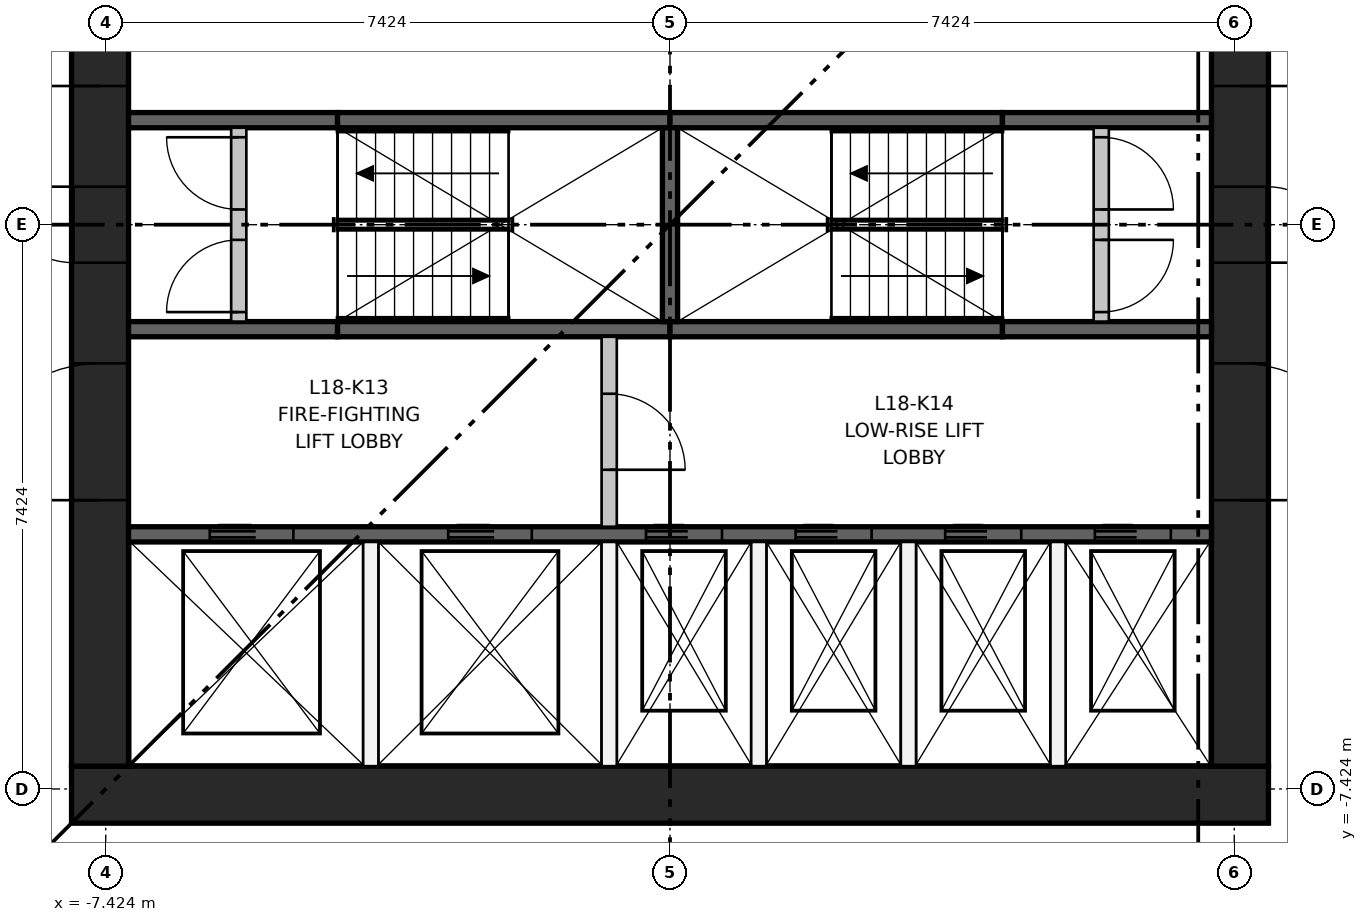
"""IFC4 building model, lengths in metres.
Left out: names, types, materials, properties, quantities, classifications, styles, units other than length and angle.
Written with IfcOpenShell. Run it as: python <this file> out.ifc"""

import sys

from ifc_helpers import new_model, si_unit, direction, frame, frame_2d, origin, place, context, subcontext, project, spatial, rectangle, extrude, element, fill, save


model = new_model("IFC4")
c1 = context("Model", 3, precision=1e-05, world=origin(), true_north=direction((0.0, 1.0)))
c2 = subcontext(c1, "Body", "Model", "MODEL_VIEW")
j1 = project(units=[si_unit("LENGTHUNIT", "METRE"), si_unit("PLANEANGLEUNIT", "RADIAN")], contexts=[c1])
p1 = place(None, origin())
s1 = spatial("IfcSite", under=j1, at=p1, CompositionType="ELEMENT")
p2 = place(p1, origin())
s2 = spatial("IfcBuilding", under=s1, at=p2, CompositionType="ELEMENT")
p3 = place(p2, frame((0.0, 0.0, 72.75)))
s3 = spatial("IfcBuildingStorey", under=s2, at=p3, CompositionType="ELEMENT", Elevation=72.75)
p4 = place(p3, frame((-7.874, -7.499, 0.0), z_axis=(0.0, 0.0, 1.0), x_axis=(1.0, 0.0, 0.0)))
e1 = element("IfcWall", 1, at=p4, inside=s3, PredefinedType="SHEAR", context=c2, shape_type="SweptSolid", body=[
    extrude(rectangle(XDim=15.748, YDim=0.75, at=frame_2d((7.874, 0.0))), origin(), (0.0, 0.0, 1.0), 3.65),
])
p5 = place(p3, frame((-7.499, -7.124, 0.0), z_axis=(0.0, 0.0, 1.0), x_axis=(0.0, 1.0, 0.0)))
e2 = element("IfcWall", 2, at=p5, inside=s3, PredefinedType="SHEAR", context=c2, shape_type="SweptSolid", body=[
    extrude(rectangle(XDim=14.248, YDim=0.75, at=frame_2d((7.124, 0.0))), origin(), (0.0, 0.0, 1.0), 3.65),
])
p6 = place(p5, frame((6.624, 0.0, 0.0)))
e3 = element("IfcOpeningElement", 3, at=p6, cuts=e2, PredefinedType="OPENING", context=c2, shape_type="SweptSolid", body=[
    extrude(rectangle(XDim=1.0, YDim=2.1, at=frame_2d((0.5, 1.05))), frame((0.0, 0.385, 0.0), z_axis=(0.0, -1.0, 0.0), x_axis=(1.0, 0.0, 0.0)), (0.0, 0.0, 1.0), 0.77),
])
p7 = place(p5, frame((3.5, 0.0, 0.0)))
e4 = element("IfcOpeningElement", 4, at=p7, cuts=e2, PredefinedType="OPENING", context=c2, shape_type="SweptSolid", body=[
    extrude(rectangle(XDim=1.8, YDim=2.1, at=frame_2d((0.9, 1.05))), frame((0.0, 0.385, 0.0), z_axis=(0.0, -1.0, 0.0), x_axis=(1.0, 0.0, 0.0)), (0.0, 0.0, 1.0), 0.77),
])
p8 = place(p5, frame((8.948, 0.0, 0.0)))
e5 = element("IfcOpeningElement", 5, at=p8, cuts=e2, PredefinedType="OPENING", context=c2, shape_type="SweptSolid", body=[
    extrude(rectangle(XDim=1.8, YDim=2.1, at=frame_2d((0.9, 1.05))), frame((0.0, 0.385, 0.0), z_axis=(0.0, -1.0, 0.0), x_axis=(1.0, 0.0, 0.0)), (0.0, 0.0, 1.0), 0.77),
])
p9 = place(p5, frame((12.124, 0.0, 0.0)))
e6 = element("IfcOpeningElement", 6, at=p9, cuts=e2, PredefinedType="OPENING", context=c2, shape_type="SweptSolid", body=[
    extrude(rectangle(XDim=1.0, YDim=2.1, at=frame_2d((0.5, 1.05))), frame((0.0, 0.385, 0.0), z_axis=(0.0, -1.0, 0.0), x_axis=(1.0, 0.0, 0.0)), (0.0, 0.0, 1.0), 0.77),
])
p10 = place(p3, frame((7.499, -7.124, 0.0), z_axis=(0.0, 0.0, 1.0), x_axis=(0.0, 1.0, 0.0)))
e7 = element("IfcWall", 7, at=p10, inside=s3, PredefinedType="SHEAR", context=c2, shape_type="SweptSolid", body=[
    extrude(rectangle(XDim=14.248, YDim=0.75, at=frame_2d((7.124, 0.0))), origin(), (0.0, 0.0, 1.0), 3.65),
])
p11 = place(p10, frame((6.624, 0.0, 0.0)))
e8 = element("IfcOpeningElement", 8, at=p11, cuts=e7, PredefinedType="OPENING", context=c2, shape_type="SweptSolid", body=[
    extrude(rectangle(XDim=1.0, YDim=2.1, at=frame_2d((0.5, 1.05))), frame((0.0, 0.385, 0.0), z_axis=(0.0, -1.0, 0.0), x_axis=(1.0, 0.0, 0.0)), (0.0, 0.0, 1.0), 0.77),
])
p12 = place(p10, frame((3.5, 0.0, 0.0)))
e9 = element("IfcOpeningElement", 9, at=p12, cuts=e7, PredefinedType="OPENING", context=c2, shape_type="SweptSolid", body=[
    extrude(rectangle(XDim=1.8, YDim=2.1, at=frame_2d((0.9, 1.05))), frame((0.0, 0.385, 0.0), z_axis=(0.0, -1.0, 0.0), x_axis=(1.0, 0.0, 0.0)), (0.0, 0.0, 1.0), 0.77),
])
p13 = place(p10, frame((8.948, 0.0, 0.0)))
e10 = element("IfcOpeningElement", 10, at=p13, cuts=e7, PredefinedType="OPENING", context=c2, shape_type="SweptSolid", body=[
    extrude(rectangle(XDim=1.8, YDim=2.1, at=frame_2d((0.9, 1.05))), frame((0.0, 0.385, 0.0), z_axis=(0.0, -1.0, 0.0), x_axis=(1.0, 0.0, 0.0)), (0.0, 0.0, 1.0), 0.77),
])
p14 = place(p3, frame((-7.124, -4.074, 0.0), z_axis=(0.0, 0.0, 1.0), x_axis=(1.0, 0.0, 0.0)))
e11 = element("IfcWall", 11, at=p14, inside=s3, PredefinedType="SHEAR", context=c2, shape_type="SweptSolid", body=[
    extrude(rectangle(XDim=14.248, YDim=0.2, at=frame_2d((7.124, 0.0))), origin(), (0.0, 0.0, 1.0), 3.3),
])
p15 = place(p14, frame((1.069, 0.0, 0.0)))
e12 = element("IfcOpeningElement", 12, at=p15, cuts=e11, PredefinedType="OPENING", context=c2, shape_type="SweptSolid", body=[
    extrude(rectangle(XDim=1.1, YDim=2.1, at=frame_2d((0.55, 1.05))), frame((0.0, 0.11, 0.0), z_axis=(0.0, -1.0, 0.0), x_axis=(1.0, 0.0, 0.0)), (0.0, 0.0, 1.0), 0.22),
])
p16 = place(p14, frame((4.206, 0.0, 0.0)))
e13 = element("IfcOpeningElement", 13, at=p16, cuts=e11, PredefinedType="OPENING", context=c2, shape_type="SweptSolid", body=[
    extrude(rectangle(XDim=1.1, YDim=2.1, at=frame_2d((0.55, 1.05))), frame((0.0, 0.11, 0.0), z_axis=(0.0, -1.0, 0.0), x_axis=(1.0, 0.0, 0.0)), (0.0, 0.0, 1.0), 0.22),
])
p17 = place(p14, frame((6.808, 0.0, 0.0)))
e14 = element("IfcOpeningElement", 14, at=p17, cuts=e11, PredefinedType="OPENING", context=c2, shape_type="SweptSolid", body=[
    extrude(rectangle(XDim=1.0, YDim=2.1, at=frame_2d((0.5, 1.05))), frame((0.0, 0.11, 0.0), z_axis=(0.0, -1.0, 0.0), x_axis=(1.0, 0.0, 0.0)), (0.0, 0.0, 1.0), 0.22),
])
p18 = place(p14, frame((8.777, 0.0, 0.0)))
e15 = element("IfcOpeningElement", 15, at=p18, cuts=e11, PredefinedType="OPENING", context=c2, shape_type="SweptSolid", body=[
    extrude(rectangle(XDim=1.0, YDim=2.1, at=frame_2d((0.5, 1.05))), frame((0.0, 0.11, 0.0), z_axis=(0.0, -1.0, 0.0), x_axis=(1.0, 0.0, 0.0)), (0.0, 0.0, 1.0), 0.22),
])
p19 = place(p14, frame((10.745, 0.0, 0.0)))
e16 = element("IfcOpeningElement", 16, at=p19, cuts=e11, PredefinedType="OPENING", context=c2, shape_type="SweptSolid", body=[
    extrude(rectangle(XDim=1.0, YDim=2.1, at=frame_2d((0.5, 1.05))), frame((0.0, 0.11, 0.0), z_axis=(0.0, -1.0, 0.0), x_axis=(1.0, 0.0, 0.0)), (0.0, 0.0, 1.0), 0.22),
])
p20 = place(p14, frame((12.714, 0.0, 0.0)))
e17 = element("IfcOpeningElement", 17, at=p20, cuts=e11, PredefinedType="OPENING", context=c2, shape_type="SweptSolid", body=[
    extrude(rectangle(XDim=1.0, YDim=2.1, at=frame_2d((0.5, 1.05))), frame((0.0, 0.11, 0.0), z_axis=(0.0, -1.0, 0.0), x_axis=(1.0, 0.0, 0.0)), (0.0, 0.0, 1.0), 0.22),
])
p21 = place(p3, frame((-7.124, -1.375, 0.0), z_axis=(0.0, 0.0, 1.0), x_axis=(1.0, 0.0, 0.0)))
e18 = element("IfcWall", 18, at=p21, inside=s3, PredefinedType="SHEAR", context=c2, shape_type="SweptSolid", body=[
    extrude(rectangle(XDim=2.75, YDim=0.2, at=frame_2d((1.375, 0.0))), origin(), (0.0, 0.0, 1.0), 3.3),
])
for number, where, z_axis, x_axis in (
    (19, (-4.374, -1.375, 0.0), (0.0, 0.0, 1.0), (1.0, 0.0, 0.0)),
    (20, (0.0, -1.375, 0.0), (0.0, 0.0, 1.0), (1.0, 0.0, 0.0)),
):
    element("IfcWall", number, at=place(p3, frame(where, z_axis=z_axis, x_axis=x_axis)), inside=s3, PredefinedType="SHEAR", context=c2, shape_type="SweptSolid", body=[
        extrude(rectangle(XDim=4.374, YDim=0.2, at=frame_2d((2.187, 0.0))), origin(), (0.0, 0.0, 1.0), 3.3),
    ])
for number, where, z_axis, x_axis in (
    (21, (4.374, -1.375, 0.0), (0.0, 0.0, 1.0), (1.0, 0.0, 0.0)),
    (22, (-7.124, 1.375, 0.0), (0.0, 0.0, 1.0), (1.0, 0.0, 0.0)),
):
    element("IfcWall", number, at=place(p3, frame(where, z_axis=z_axis, x_axis=x_axis)), inside=s3, PredefinedType="SHEAR", context=c2, shape_type="SweptSolid", body=[
        extrude(rectangle(XDim=2.75, YDim=0.2, at=frame_2d((1.375, 0.0))), origin(), (0.0, 0.0, 1.0), 3.3),
    ])
for number, where, z_axis, x_axis in (
    (23, (-4.374, 1.375, 0.0), (0.0, 0.0, 1.0), (1.0, 0.0, 0.0)),
    (24, (0.0, 1.375, 0.0), (0.0, 0.0, 1.0), (1.0, 0.0, 0.0)),
):
    element("IfcWall", number, at=place(p3, frame(where, z_axis=z_axis, x_axis=x_axis)), inside=s3, PredefinedType="SHEAR", context=c2, shape_type="SweptSolid", body=[
        extrude(rectangle(XDim=4.374, YDim=0.2, at=frame_2d((2.187, 0.0))), origin(), (0.0, 0.0, 1.0), 3.3),
    ])
p22 = place(p3, frame((4.374, 1.375, 0.0), z_axis=(0.0, 0.0, 1.0), x_axis=(1.0, 0.0, 0.0)))
e25 = element("IfcWall", 25, at=p22, inside=s3, PredefinedType="SHEAR", context=c2, shape_type="SweptSolid", body=[
    extrude(rectangle(XDim=2.75, YDim=0.2, at=frame_2d((1.375, 0.0))), origin(), (0.0, 0.0, 1.0), 3.3),
])
p23 = place(p3, frame((0.0, -1.275, 0.0), z_axis=(0.0, 0.0, 1.0), x_axis=(0.0, 1.0, 0.0)))
e26 = element("IfcWall", 26, at=p23, inside=s3, PredefinedType="SHEAR", context=c2, shape_type="SweptSolid", body=[
    extrude(rectangle(XDim=2.55, YDim=0.2, at=frame_2d((1.275, 0.0))), origin(), (0.0, 0.0, 1.0), 3.3),
])
for number, where, z_axis, x_axis in (
    (27, (-3.937, -7.124, 0.0), (0.0, 0.0, 1.0), (0.0, 1.0, 0.0)),
    (28, (-0.8, -7.124, 0.0), (0.0, 0.0, 1.0), (0.0, 1.0, 0.0)),
):
    element("IfcWall", number, at=place(p3, frame(where, z_axis=z_axis, x_axis=x_axis)), inside=s3, PredefinedType="PARTITIONING", context=c2, shape_type="SweptSolid", body=[
        extrude(rectangle(XDim=2.95, YDim=0.2, at=frame_2d((1.475, 0.0))), origin(), (0.0, 0.0, 1.0), 3.3),
    ])
p24 = place(p3, frame((-0.8, -3.974, 0.0), z_axis=(0.0, 0.0, 1.0), x_axis=(0.0, 1.0, 0.0)))
e29 = element("IfcWall", 29, at=p24, inside=s3, PredefinedType="PARTITIONING", context=c2, shape_type="SweptSolid", body=[
    extrude(rectangle(XDim=2.499, YDim=0.2, at=frame_2d((1.25, 0.0))), origin(), (0.0, 0.0, 1.0), 3.3),
])
p25 = place(p24, frame((0.75, 0.0, 0.0)))
e30 = element("IfcOpeningElement", 30, at=p25, cuts=e29, PredefinedType="OPENING", context=c2, shape_type="SweptSolid", body=[
    extrude(rectangle(XDim=1.0, YDim=2.1, at=frame_2d((0.5, 1.05))), frame((0.0, 0.11, 0.0), z_axis=(0.0, -1.0, 0.0), x_axis=(1.0, 0.0, 0.0)), (0.0, 0.0, 1.0), 0.22),
])
for number, where, z_axis, x_axis in (
    (31, (1.168, -7.124, 0.0), (0.0, 0.0, 1.0), (0.0, 1.0, 0.0)),
    (32, (3.137, -7.124, 0.0), (0.0, 0.0, 1.0), (0.0, 1.0, 0.0)),
    (33, (5.105, -7.124, 0.0), (0.0, 0.0, 1.0), (0.0, 1.0, 0.0)),
):
    element("IfcWall", number, at=place(p3, frame(where, z_axis=z_axis, x_axis=x_axis)), inside=s3, PredefinedType="PARTITIONING", context=c2, shape_type="SweptSolid", body=[
        extrude(rectangle(XDim=2.95, YDim=0.2, at=frame_2d((1.475, 0.0))), origin(), (0.0, 0.0, 1.0), 3.3),
    ])
p26 = place(p3, frame((-5.674, -1.275, 0.0), z_axis=(0.0, 0.0, 1.0), x_axis=(0.0, 1.0, 0.0)))
e34 = element("IfcWall", 34, at=p26, inside=s3, PredefinedType="PARTITIONING", context=c2, shape_type="SweptSolid", body=[
    extrude(rectangle(XDim=2.55, YDim=0.2, at=frame_2d((1.275, 0.0))), origin(), (0.0, 0.0, 1.0), 3.3),
])
p27 = place(p26, frame((0.125, 0.0, 0.0)))
e35 = element("IfcOpeningElement", 35, at=p27, cuts=e34, PredefinedType="OPENING", context=c2, shape_type="SweptSolid", body=[
    extrude(rectangle(XDim=0.95, YDim=2.1, at=frame_2d((0.475, 1.05))), frame((0.0, 0.11, 0.0), z_axis=(0.0, -1.0, 0.0), x_axis=(1.0, 0.0, 0.0)), (0.0, 0.0, 1.0), 0.22),
])
p28 = place(p26, frame((1.475, 0.0, 0.0)))
e36 = element("IfcOpeningElement", 36, at=p28, cuts=e34, PredefinedType="OPENING", context=c2, shape_type="SweptSolid", body=[
    extrude(rectangle(XDim=0.95, YDim=2.1, at=frame_2d((0.475, 1.05))), frame((0.0, 0.11, 0.0), z_axis=(0.0, -1.0, 0.0), x_axis=(1.0, 0.0, 0.0)), (0.0, 0.0, 1.0), 0.22),
])
p29 = place(p3, frame((5.674, -1.275, 0.0), z_axis=(0.0, 0.0, 1.0), x_axis=(0.0, 1.0, 0.0)))
e37 = element("IfcWall", 37, at=p29, inside=s3, PredefinedType="PARTITIONING", context=c2, shape_type="SweptSolid", body=[
    extrude(rectangle(XDim=2.55, YDim=0.2, at=frame_2d((1.275, 0.0))), origin(), (0.0, 0.0, 1.0), 3.3),
])
p30 = place(p29, frame((0.125, 0.0, 0.0)))
e38 = element("IfcOpeningElement", 38, at=p30, cuts=e37, PredefinedType="OPENING", context=c2, shape_type="SweptSolid", body=[
    extrude(rectangle(XDim=0.95, YDim=2.1, at=frame_2d((0.475, 1.05))), frame((0.0, 0.11, 0.0), z_axis=(0.0, -1.0, 0.0), x_axis=(1.0, 0.0, 0.0)), (0.0, 0.0, 1.0), 0.22),
])
p31 = place(p29, frame((1.475, 0.0, 0.0)))
e39 = element("IfcOpeningElement", 39, at=p31, cuts=e37, PredefinedType="OPENING", context=c2, shape_type="SweptSolid", body=[
    extrude(rectangle(XDim=0.95, YDim=2.1, at=frame_2d((0.475, 1.05))), frame((0.0, 0.11, 0.0), z_axis=(0.0, -1.0, 0.0), x_axis=(1.0, 0.0, 0.0)), (0.0, 0.0, 1.0), 0.22),
])
p32 = place(p15, origin())
e40 = element("IfcDoor", 40, at=p32, inside=s3, OperationType="DOUBLE_DOOR_SLIDING", PredefinedType="DOOR", context=c2, shape_type="SweptSolid", body=[
    extrude(rectangle(XDim=1.1, YDim=2.1, at=frame_2d((0.55, 1.05))), frame((0.0, 0.025, 0.0), z_axis=(0.0, -1.0, 0.0), x_axis=(1.0, 0.0, 0.0)), (0.0, 0.0, 1.0), 0.05),
])
fill(e12, e40)
p33 = place(p16, origin())
e41 = element("IfcDoor", 41, at=p33, inside=s3, OperationType="DOUBLE_DOOR_SLIDING", PredefinedType="DOOR", context=c2, shape_type="SweptSolid", body=[
    extrude(rectangle(XDim=1.1, YDim=2.1, at=frame_2d((0.55, 1.05))), frame((0.0, 0.025, 0.0), z_axis=(0.0, -1.0, 0.0), x_axis=(1.0, 0.0, 0.0)), (0.0, 0.0, 1.0), 0.05),
])
fill(e13, e41)
p34 = place(p17, origin())
e42 = element("IfcDoor", 42, at=p34, inside=s3, OperationType="DOUBLE_DOOR_SLIDING", PredefinedType="DOOR", context=c2, shape_type="SweptSolid", body=[
    extrude(rectangle(XDim=1.0, YDim=2.1, at=frame_2d((0.5, 1.05))), frame((0.0, 0.025, 0.0), z_axis=(0.0, -1.0, 0.0), x_axis=(1.0, 0.0, 0.0)), (0.0, 0.0, 1.0), 0.05),
])
fill(e14, e42)
p35 = place(p18, origin())
e43 = element("IfcDoor", 43, at=p35, inside=s3, OperationType="DOUBLE_DOOR_SLIDING", PredefinedType="DOOR", context=c2, shape_type="SweptSolid", body=[
    extrude(rectangle(XDim=1.0, YDim=2.1, at=frame_2d((0.5, 1.05))), frame((0.0, 0.025, 0.0), z_axis=(0.0, -1.0, 0.0), x_axis=(1.0, 0.0, 0.0)), (0.0, 0.0, 1.0), 0.05),
])
fill(e15, e43)
p36 = place(p19, origin())
e44 = element("IfcDoor", 44, at=p36, inside=s3, OperationType="DOUBLE_DOOR_SLIDING", PredefinedType="DOOR", context=c2, shape_type="SweptSolid", body=[
    extrude(rectangle(XDim=1.0, YDim=2.1, at=frame_2d((0.5, 1.05))), frame((0.0, 0.025, 0.0), z_axis=(0.0, -1.0, 0.0), x_axis=(1.0, 0.0, 0.0)), (0.0, 0.0, 1.0), 0.05),
])
fill(e16, e44)
p37 = place(p20, origin())
e45 = element("IfcDoor", 45, at=p37, inside=s3, OperationType="DOUBLE_DOOR_SLIDING", PredefinedType="DOOR", context=c2, shape_type="SweptSolid", body=[
    extrude(rectangle(XDim=1.0, YDim=2.1, at=frame_2d((0.5, 1.05))), frame((0.0, 0.025, 0.0), z_axis=(0.0, -1.0, 0.0), x_axis=(1.0, 0.0, 0.0)), (0.0, 0.0, 1.0), 0.05),
])
fill(e17, e45)
p38 = place(p27, origin())
e46 = element("IfcDoor", 46, at=p38, inside=s3, OperationType="SINGLE_SWING_LEFT", PredefinedType="DOOR", context=c2, shape_type="SweptSolid", body=[
    extrude(rectangle(XDim=0.95, YDim=2.1, at=frame_2d((0.475, 1.05))), frame((0.0, 0.025, 0.0), z_axis=(0.0, -1.0, 0.0), x_axis=(1.0, 0.0, 0.0)), (0.0, 0.0, 1.0), 0.05),
])
fill(e35, e46)
p39 = place(p28, origin())
e47 = element("IfcDoor", 47, at=p39, inside=s3, OperationType="SINGLE_SWING_RIGHT", PredefinedType="DOOR", context=c2, shape_type="SweptSolid", body=[
    extrude(rectangle(XDim=0.95, YDim=2.1, at=frame_2d((0.475, 1.05))), frame((0.0, 0.025, 0.0), z_axis=(0.0, -1.0, 0.0), x_axis=(1.0, 0.0, 0.0)), (0.0, 0.0, 1.0), 0.05),
])
fill(e36, e47)
p40 = place(p30, frame((0.95, 0.0, 0.0), z_axis=(0.0, 0.0, 1.0), x_axis=(-1.0, 0.0, 0.0)))
e48 = element("IfcDoor", 48, at=p40, inside=s3, OperationType="SINGLE_SWING_RIGHT", PredefinedType="DOOR", context=c2, shape_type="SweptSolid", body=[
    extrude(rectangle(XDim=0.95, YDim=2.1, at=frame_2d((0.475, 1.05))), frame((0.0, 0.025, 0.0), z_axis=(0.0, -1.0, 0.0), x_axis=(1.0, 0.0, 0.0)), (0.0, 0.0, 1.0), 0.05),
])
fill(e38, e48)
p41 = place(p31, frame((0.95, 0.0, 0.0), z_axis=(0.0, 0.0, 1.0), x_axis=(-1.0, 0.0, 0.0)))
e49 = element("IfcDoor", 49, at=p41, inside=s3, OperationType="SINGLE_SWING_LEFT", PredefinedType="DOOR", context=c2, shape_type="SweptSolid", body=[
    extrude(rectangle(XDim=0.95, YDim=2.1, at=frame_2d((0.475, 1.05))), frame((0.0, 0.025, 0.0), z_axis=(0.0, -1.0, 0.0), x_axis=(1.0, 0.0, 0.0)), (0.0, 0.0, 1.0), 0.05),
])
fill(e39, e49)
p42 = place(p25, frame((1.0, 0.0, 0.0), z_axis=(0.0, 0.0, 1.0), x_axis=(-1.0, 0.0, 0.0)))
e50 = element("IfcDoor", 50, at=p42, inside=s3, OperationType="SINGLE_SWING_LEFT", PredefinedType="DOOR", context=c2, shape_type="SweptSolid", body=[
    extrude(rectangle(XDim=1.0, YDim=2.1, at=frame_2d((0.5, 1.05))), frame((0.0, 0.025, 0.0), z_axis=(0.0, -1.0, 0.0), x_axis=(1.0, 0.0, 0.0)), (0.0, 0.0, 1.0), 0.05),
])
fill(e30, e50)
p43 = place(p6, origin())
e51 = element("IfcDoor", 51, at=p43, inside=s3, OperationType="SINGLE_SWING_RIGHT", PredefinedType="DOOR", context=c2, shape_type="SweptSolid", body=[
    extrude(rectangle(XDim=1.0, YDim=2.1, at=frame_2d((0.5, 1.05))), frame((0.0, 0.375, 0.0), z_axis=(0.0, -1.0, 0.0), x_axis=(1.0, 0.0, 0.0)), (0.0, 0.0, 1.0), 0.05),
])
fill(e3, e51)
p44 = place(p7, origin())
e52 = element("IfcDoor", 52, at=p44, inside=s3, OperationType="DOUBLE_DOOR_SINGLE_SWING", PredefinedType="DOOR", context=c2, shape_type="SweptSolid", body=[
    extrude(rectangle(XDim=1.8, YDim=2.1, at=frame_2d((0.9, 1.05))), frame((0.0, 0.025, 0.0), z_axis=(0.0, -1.0, 0.0), x_axis=(1.0, 0.0, 0.0)), (0.0, 0.0, 1.0), 0.05),
])
fill(e4, e52)
p45 = place(p8, origin())
e53 = element("IfcDoor", 53, at=p45, inside=s3, OperationType="DOUBLE_DOOR_SINGLE_SWING", PredefinedType="DOOR", context=c2, shape_type="SweptSolid", body=[
    extrude(rectangle(XDim=1.8, YDim=2.1, at=frame_2d((0.9, 1.05))), frame((0.0, 0.025, 0.0), z_axis=(0.0, -1.0, 0.0), x_axis=(1.0, 0.0, 0.0)), (0.0, 0.0, 1.0), 0.05),
])
fill(e5, e53)
p46 = place(p11, frame((1.0, 0.0, 0.0), z_axis=(0.0, 0.0, 1.0), x_axis=(-1.0, 0.0, 0.0)))
e54 = element("IfcDoor", 54, at=p46, inside=s3, OperationType="SINGLE_SWING_LEFT", PredefinedType="DOOR", context=c2, shape_type="SweptSolid", body=[
    extrude(rectangle(XDim=1.0, YDim=2.1, at=frame_2d((0.5, 1.05))), frame((0.0, 0.375, 0.0), z_axis=(0.0, -1.0, 0.0), x_axis=(1.0, 0.0, 0.0)), (0.0, 0.0, 1.0), 0.05),
])
fill(e8, e54)
p47 = place(p12, frame((1.8, 0.0, 0.0), z_axis=(0.0, 0.0, 1.0), x_axis=(-1.0, 0.0, 0.0)))
e55 = element("IfcDoor", 55, at=p47, inside=s3, OperationType="DOUBLE_DOOR_SINGLE_SWING", PredefinedType="DOOR", context=c2, shape_type="SweptSolid", body=[
    extrude(rectangle(XDim=1.8, YDim=2.1, at=frame_2d((0.9, 1.05))), frame((0.0, 0.025, 0.0), z_axis=(0.0, -1.0, 0.0), x_axis=(1.0, 0.0, 0.0)), (0.0, 0.0, 1.0), 0.05),
])
fill(e9, e55)
p48 = place(p13, frame((1.8, 0.0, 0.0), z_axis=(0.0, 0.0, 1.0), x_axis=(-1.0, 0.0, 0.0)))
e56 = element("IfcDoor", 56, at=p48, inside=s3, OperationType="DOUBLE_DOOR_SINGLE_SWING", PredefinedType="DOOR", context=c2, shape_type="SweptSolid", body=[
    extrude(rectangle(XDim=1.8, YDim=2.1, at=frame_2d((0.9, 1.05))), frame((0.0, 0.025, 0.0), z_axis=(0.0, -1.0, 0.0), x_axis=(1.0, 0.0, 0.0)), (0.0, 0.0, 1.0), 0.05),
])
fill(e10, e56)
save(model, sys.argv[1])
